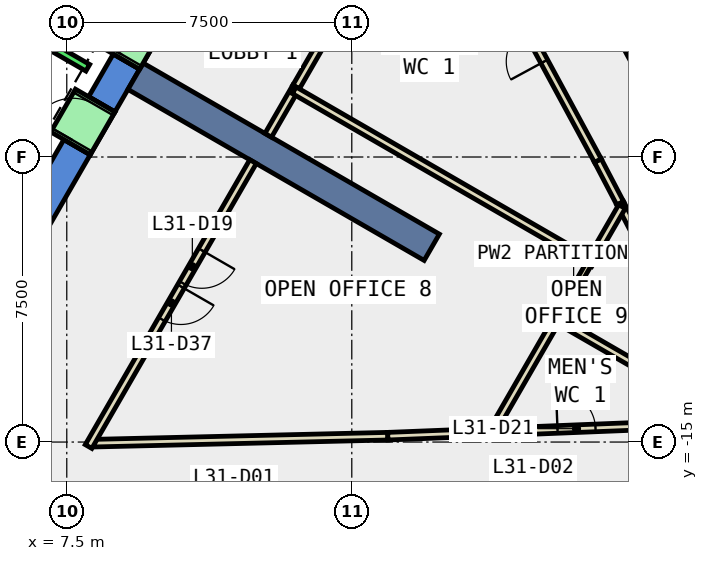
"""IFC4 building model, lengths in metres.
Left out: names, types, materials, properties, quantities, classifications, styles, units other than length and angle.
Written with IfcOpenShell. Run it as: python <this file> out.ifc"""

import sys

from ifc_helpers import new_model, si_unit, direction, frame, frame_2d, origin, place, context, subcontext, project, spatial, polyline, rectangle, outline, extrude, element, fill, save


model = new_model("IFC4")
c1 = context("Model", 3, precision=1e-05, world=origin(), true_north=direction((0.0, 1.0)))
c2 = subcontext(c1, "Body", "Model", "MODEL_VIEW")
j1 = project(units=[si_unit("LENGTHUNIT", "METRE"), si_unit("PLANEANGLEUNIT", "RADIAN")], contexts=[c1])
p1 = place(None, origin())
s1 = spatial("IfcSite", under=j1, at=p1, CompositionType="ELEMENT")
p2 = place(p1, origin())
s2 = spatial("IfcBuilding", under=s1, at=p2, CompositionType="ELEMENT")
p3 = place(p2, frame((0.0, 0.0, 142.4)))
s3 = spatial("IfcBuildingStorey", under=s2, at=p3, CompositionType="ELEMENT", Elevation=142.4)
p4 = place(p3, frame((0.0, 0.0, -0.4)))
e1 = element("IfcWall", 1, at=p4, inside=s3, PredefinedType="SHEAR", context=c2, shape_type="SweptSolid", body=[
    extrude(outline(polyline([(8.117, -7.44), (7.424, -7.04), (6.466, -8.7), (6.928, -9.5), (8.117, -7.44)])), origin(), (0.0, 0.0, 1.0), 4.2),
])
p5 = place(p3, frame((0.0, 0.0, -0.4)))
e2 = element("IfcWall", 2, at=p5, inside=s3, PredefinedType="SHEAR", context=c2, shape_type="SweptSolid", body=[
    extrude(outline(polyline([(9.417, -5.189), (8.724, -4.789), (8.075, -5.914), (8.767, -6.314), (9.417, -5.189)])), origin(), (0.0, 0.0, 1.0), 4.2),
])
p6 = place(p3, frame((0.0, 0.0, 3.6)))
e3 = element("IfcWall", 3, at=p6, inside=s3, PredefinedType="SHEAR", context=c2, shape_type="SweptSolid", body=[
    extrude(outline(polyline([(8.767, -6.314), (8.075, -5.914), (7.424, -7.04), (8.117, -7.44), (8.767, -6.314)])), origin(), (0.0, 0.0, 1.0), 0.2),
])
p7 = place(p3, frame((0.0, 0.0, 3.6)))
e4 = element("IfcWall", 4, at=p7, inside=s3, PredefinedType="SHEAR", context=c2, shape_type="SweptSolid", body=[
    extrude(outline(polyline([(10.067, -4.063), (9.374, -3.663), (8.724, -4.789), (9.417, -5.189), (10.067, -4.063)])), origin(), (0.0, 0.0, 1.0), 0.2),
])
p8 = place(p3, frame((9.31, -5.375, -0.4), z_axis=(0.0, 0.0, 1.0), x_axis=(0.866017533419, -0.500013631625, 0.0)))
e5 = element("IfcWall", 5, at=p8, inside=s3, PredefinedType="SHEAR", context=c2, shape_type="SweptSolid", body=[
    extrude(rectangle(XDim=9.0, YDim=0.8, at=frame_2d((4.5, 0.0))), origin(), (0.0, 0.0, 1.0), 4.2),
])
p9 = place(p3, frame((8.223, -15.029, 0.0), z_axis=(0.0, 0.0, 1.0), x_axis=(0.99971920994, 0.023696018186, 0.0)))
e6 = element("IfcWall", 6, at=p9, inside=s3, PredefinedType="PARTITIONING", context=c2, shape_type="SweptSolid", body=[
    extrude(rectangle(XDim=7.727, YDim=0.2, at=frame_2d((3.864, 0.0))), origin(), (0.0, 0.0, 1.0), 3.8),
])
p10 = place(p3, frame((15.948, -14.846, 0.0), z_axis=(0.0, 0.0, 1.0), x_axis=(0.999208477774, 0.039779617206, 0.0)))
e7 = element("IfcWall", 7, at=p10, inside=s3, PredefinedType="PARTITIONING", context=c2, shape_type="SweptSolid", body=[
    extrude(rectangle(XDim=2.639, YDim=0.2, at=frame_2d((1.32, 0.0))), origin(), (0.0, 0.0, 1.0), 3.8),
])
p11 = place(p3, frame((22.063, -8.717, 0.0), z_axis=(0.0, 0.0, 1.0), x_axis=(-0.463776683525, 0.885952136302, 0.0)))
e8 = element("IfcWall", 8, at=p11, inside=s3, PredefinedType="PARTITIONING", context=c2, shape_type="SweptSolid", body=[
    extrude(rectangle(XDim=1.268, YDim=0.2, at=frame_2d((0.634, 0.0))), origin(), (0.0, 0.0, 1.0), 3.8),
])
p12 = place(p3, frame((21.475, -7.594, 0.0), z_axis=(0.0, 0.0, 1.0), x_axis=(-0.475918691018, 0.879489283357, 0.0)))
e9 = element("IfcWall", 9, at=p12, inside=s3, PredefinedType="PARTITIONING", context=c2, shape_type="SweptSolid", body=[
    extrude(rectangle(XDim=6.928, YDim=0.2, at=frame_2d((3.464, 0.0))), origin(), (0.0, 0.0, 1.0), 3.8),
])
p13 = place(p12, frame((2.964, 0.0, 0.0)))
e10 = element("IfcOpeningElement", 10, at=p13, cuts=e9, PredefinedType="OPENING", context=c2, shape_type="SweptSolid", body=[
    extrude(rectangle(XDim=1.0, YDim=2.1, at=frame_2d((0.5, 1.05))), frame((0.0, 0.11, 0.0), z_axis=(0.0, -1.0, 0.0), x_axis=(1.0, 0.0, 0.0)), (0.0, 0.0, 1.0), 0.22),
])
p14 = place(p3, frame((18.585, -14.741, 0.0), z_axis=(0.0, 0.0, 1.0), x_axis=(0.99920304932, 0.039915739113, 0.0)))
e11 = element("IfcWall", 11, at=p14, inside=s3, PredefinedType="PARTITIONING", context=c2, shape_type="SweptSolid", body=[
    extrude(rectangle(XDim=4.661, YDim=0.2, at=frame_2d((2.33, 0.0))), origin(), (0.0, 0.0, 1.0), 3.8),
])
p15 = place(p14, frame((1.83, 0.0, 0.0)))
e12 = element("IfcOpeningElement", 12, at=p15, cuts=e11, PredefinedType="OPENING", context=c2, shape_type="SweptSolid", body=[
    extrude(rectangle(XDim=1.0, YDim=2.1, at=frame_2d((0.5, 1.05))), frame((0.0, 0.11, 0.0), z_axis=(0.0, -1.0, 0.0), x_axis=(1.0, 0.0, 0.0)), (0.0, 0.0, 1.0), 0.22),
])
p16 = place(p3, frame((24.224, -12.845, 0.0), z_axis=(0.0, 0.0, 1.0), x_axis=(-0.463819025987, 0.885929969655, 0.0)))
e13 = element("IfcWall", 13, at=p16, inside=s3, PredefinedType="PARTITIONING", context=c2, shape_type="SweptSolid", body=[
    extrude(rectangle(XDim=4.659, YDim=0.2, at=frame_2d((2.33, 0.0))), origin(), (0.0, 0.0, 1.0), 3.8),
])
p17 = place(p16, frame((1.83, 0.0, 0.0)))
e14 = element("IfcOpeningElement", 14, at=p17, cuts=e13, PredefinedType="OPENING", context=c2, shape_type="SweptSolid", body=[
    extrude(rectangle(XDim=1.0, YDim=2.1, at=frame_2d((0.5, 1.05))), frame((0.0, 0.11, 0.0), z_axis=(0.0, -1.0, 0.0), x_axis=(1.0, 0.0, 0.0)), (0.0, 0.0, 1.0), 0.22),
])
p18 = place(p3, frame((20.018, -0.489, 0.0), z_axis=(0.0, 0.0, 1.0), x_axis=(0.476025981828, -0.87943121654, 0.0)))
e15 = element("IfcWall", 15, at=p18, inside=s3, PredefinedType="PARTITIONING", context=c2, shape_type="SweptSolid", body=[
    extrude(rectangle(XDim=6.882, YDim=0.2, at=frame_2d((3.441, 0.0))), origin(), (0.0, 0.0, 1.0), 3.8),
])
p19 = place(p18, frame((3.016, 0.0, 0.0)))
e16 = element("IfcOpeningElement", 16, at=p19, cuts=e15, PredefinedType="OPENING", context=c2, shape_type="SweptSolid", body=[
    extrude(rectangle(XDim=1.0, YDim=2.1, at=frame_2d((0.5, 1.05))), frame((0.0, 0.11, 0.0), z_axis=(0.0, -1.0, 0.0), x_axis=(1.0, 0.0, 0.0)), (0.0, 0.0, 1.0), 0.22),
])
p20 = place(p3, frame((13.535, -5.657, 0.0), z_axis=(0.0, 0.0, 1.0), x_axis=(-0.499751238113, -0.866168978898, 0.0)))
e17 = element("IfcWall", 17, at=p20, inside=s3, PredefinedType="PARTITIONING", context=c2, shape_type="SweptSolid", body=[
    extrude(rectangle(XDim=1.469, YDim=0.2, at=frame_2d((0.734, 0.0))), origin(), (0.0, 0.0, 1.0), 3.8),
])
p21 = place(p3, frame((17.124, 0.56, 0.0), z_axis=(0.0, 0.0, 1.0), x_axis=(-0.49996876383, -0.866043437245, 0.0)))
e18 = element("IfcWall", 18, at=p21, inside=s3, PredefinedType="PARTITIONING", context=c2, shape_type="SweptSolid", body=[
    extrude(rectangle(XDim=7.179, YDim=0.2, at=frame_2d((3.589, 0.0))), origin(), (0.0, 0.0, 1.0), 3.8),
])
p22 = place(p3, frame((13.485, -5.744, 0.0), z_axis=(0.0, 0.0, 1.0), x_axis=(0.865950545648, -0.500129635687, 0.0)))
e19 = element("IfcWall", 19, at=p22, inside=s3, PredefinedType="PARTITIONING", context=c2, shape_type="SweptSolid", body=[
    extrude(rectangle(XDim=9.1, YDim=0.2, at=frame_2d((4.55, 0.0))), origin(), (0.0, 0.0, 1.0), 3.8),
])
p23 = place(p3, frame((20.347, -11.858, 0.0), z_axis=(0.0, 0.0, 1.0), x_axis=(-0.49990681678, -0.866079196458, 0.0)))
e20 = element("IfcWall", 20, at=p23, inside=s3, PredefinedType="PARTITIONING", context=c2, shape_type="SweptSolid", body=[
    extrude(rectangle(XDim=3.324, YDim=0.2, at=frame_2d((1.662, 0.0))), origin(), (0.0, 0.0, 1.0), 3.8),
])
p24 = place(p3, frame((21.228, -10.331, 0.0), z_axis=(0.0, 0.0, 1.0), x_axis=(-0.499920861661, -0.866071089505, 0.0)))
e21 = element("IfcWall", 21, at=p24, inside=s3, PredefinedType="PARTITIONING", context=c2, shape_type="SweptSolid", body=[
    extrude(rectangle(XDim=1.562, YDim=0.15, at=frame_2d((0.781, 0.0))), origin(), (0.0, 0.0, 1.0), 3.8),
])
p25 = place(p3, frame((22.109, -8.805, 0.0), z_axis=(0.0, 0.0, 1.0), x_axis=(-0.499920861661, -0.866071089505, 0.0)))
e22 = element("IfcWall", 22, at=p25, inside=s3, PredefinedType="PARTITIONING", context=c2, shape_type="SweptSolid", body=[
    extrude(rectangle(XDim=1.562, YDim=0.2, at=frame_2d((0.781, 0.0))), origin(), (0.0, 0.0, 1.0), 3.8),
])
p26 = place(p3, frame((20.31, -11.721, 0.0), z_axis=(0.0, 0.0, 1.0), x_axis=(0.86603399059, -0.499985126921, 0.0)))
e23 = element("IfcWall", 23, at=p26, inside=s3, PredefinedType="PARTITIONING", context=c2, shape_type="SweptSolid", body=[
    extrude(rectangle(XDim=4.854, YDim=0.2, at=frame_2d((2.427, 0.0))), origin(), (0.0, 0.0, 1.0), 3.8),
])
p27 = place(p3, frame((12.401, -7.621, 0.0), z_axis=(0.0, 0.0, 1.0), x_axis=(-0.499964151829, -0.866046099747, 0.0)))
e24 = element("IfcWall", 24, at=p27, inside=s3, PredefinedType="PARTITIONING", context=c2, shape_type="SweptSolid", body=[
    extrude(rectangle(XDim=8.656, YDim=0.2, at=frame_2d((4.328, 0.0))), origin(), (0.0, 0.0, 1.0), 3.8),
])
p28 = place(p27, frame((2.694, 0.0, 0.0)))
e25 = element("IfcOpeningElement", 25, at=p28, cuts=e24, PredefinedType="OPENING", context=c2, shape_type="SweptSolid", body=[
    extrude(rectangle(XDim=1.0, YDim=2.1, at=frame_2d((0.5, 1.05))), frame((0.0, 0.11, 0.0), z_axis=(0.0, -1.0, 0.0), x_axis=(1.0, 0.0, 0.0)), (0.0, 0.0, 1.0), 0.22),
])
p29 = place(p27, frame((3.794, 0.0, 0.0)))
e26 = element("IfcOpeningElement", 26, at=p29, cuts=e24, PredefinedType="OPENING", context=c2, shape_type="SweptSolid", body=[
    extrude(rectangle(XDim=1.0, YDim=2.1, at=frame_2d((0.5, 1.05))), frame((0.0, 0.11, 0.0), z_axis=(0.0, -1.0, 0.0), x_axis=(1.0, 0.0, 0.0)), (0.0, 0.0, 1.0), 0.22),
])
p30 = place(p3, frame((4.451, -6.19, 0.0), z_axis=(0.0, 0.0, 1.0), x_axis=(0.50000090737, 0.866024879913, 0.0)))
e27 = element("IfcWall", 27, at=p30, inside=s3, PredefinedType="STANDARD", context=c2, shape_type="SweptSolid", body=[
    extrude(rectangle(XDim=10.6, YDim=0.2, at=frame_2d((5.3, 0.0))), origin(), (0.0, 0.0, 1.0), 3.8),
])
p31 = place(p3, frame((5.888, -3.902, 0.0), z_axis=(0.0, 0.0, 1.0), x_axis=(0.866022959057, -0.500004234368, 0.0)))
e28 = element("IfcWall", 28, at=p31, inside=s3, PredefinedType="STANDARD", context=c2, shape_type="SweptSolid", body=[
    extrude(rectangle(XDim=2.5, YDim=0.2, at=frame_2d((1.25, 0.0))), origin(), (0.0, 0.0, 1.0), 3.8),
])
p32 = place(p3, frame((7.598, -7.14, 0.0), z_axis=(0.0, 0.0, 1.0), x_axis=(0.500362116554, 0.865816234728, 0.0)))
e29 = element("IfcWall", 29, at=p32, inside=s3, PredefinedType="STANDARD", context=c2, shape_type="SweptSolid", body=[
    extrude(rectangle(XDim=1.299, YDim=1.2, at=frame_2d((0.65, 0.0))), origin(), (0.0, 0.0, 1.0), 2.4),
])
p33 = place(p32, frame((0.1, 0.0, 0.0)))
e30 = element("IfcOpeningElement", 30, at=p33, cuts=e29, PredefinedType="OPENING", context=c2, shape_type="SweptSolid", body=[
    extrude(rectangle(XDim=1.1, YDim=2.3, at=frame_2d((0.55, 1.15))), frame((0.0, 0.61, 0.0), z_axis=(0.0, -1.0, 0.0), x_axis=(1.0, 0.0, 0.0)), (0.0, 0.0, 1.0), 1.22),
])
p34 = place(p3, frame((8.898, -4.889, 0.0), z_axis=(0.0, 0.0, 1.0), x_axis=(0.500036693733, 0.866004217611, 0.0)))
e31 = element("IfcWall", 31, at=p34, inside=s3, PredefinedType="STANDARD", context=c2, shape_type="SweptSolid", body=[
    extrude(rectangle(XDim=1.3, YDim=1.2, at=frame_2d((0.65, 0.0))), origin(), (0.0, 0.0, 1.0), 2.4),
])
p35 = place(p34, frame((0.1, 0.0, 0.0)))
e32 = element("IfcOpeningElement", 32, at=p35, cuts=e31, PredefinedType="OPENING", context=c2, shape_type="SweptSolid", body=[
    extrude(rectangle(XDim=1.1, YDim=2.3, at=frame_2d((0.55, 1.15))), frame((0.0, 0.61, 0.0), z_axis=(0.0, -1.0, 0.0), x_axis=(1.0, 0.0, 0.0)), (0.0, 0.0, 1.0), 1.22),
])
p36 = place(p28, origin())
e33 = element("IfcDoor", 33, at=p36, inside=s3, OperationType="SINGLE_SWING_LEFT", PredefinedType="DOOR", context=c2, shape_type="SweptSolid", body=[
    extrude(rectangle(XDim=1.0, YDim=2.1, at=frame_2d((0.5, 1.05))), frame((0.0, 0.025, 0.0), z_axis=(0.0, -1.0, 0.0), x_axis=(1.0, 0.0, 0.0)), (0.0, 0.0, 1.0), 0.05),
])
fill(e25, e33)
p37 = place(p13, origin())
e34 = element("IfcDoor", 34, at=p37, inside=s3, OperationType="SINGLE_SWING_LEFT", PredefinedType="DOOR", context=c2, shape_type="SweptSolid", body=[
    extrude(rectangle(XDim=1.0, YDim=2.1, at=frame_2d((0.5, 1.05))), frame((0.0, 0.025, 0.0), z_axis=(0.0, -1.0, 0.0), x_axis=(1.0, 0.0, 0.0)), (0.0, 0.0, 1.0), 0.05),
])
fill(e10, e34)
p38 = place(p15, origin())
e35 = element("IfcDoor", 35, at=p38, inside=s3, OperationType="SINGLE_SWING_LEFT", PredefinedType="DOOR", context=c2, shape_type="SweptSolid", body=[
    extrude(rectangle(XDim=1.0, YDim=2.1, at=frame_2d((0.5, 1.05))), frame((0.0, 0.025, 0.0), z_axis=(0.0, -1.0, 0.0), x_axis=(1.0, 0.0, 0.0)), (0.0, 0.0, 1.0), 0.05),
])
fill(e12, e35)
p39 = place(p29, origin())
e36 = element("IfcDoor", 36, at=p39, inside=s3, OperationType="SINGLE_SWING_RIGHT", PredefinedType="DOOR", context=c2, shape_type="SweptSolid", body=[
    extrude(rectangle(XDim=1.0, YDim=2.1, at=frame_2d((0.5, 1.05))), frame((0.0, 0.025, 0.0), z_axis=(0.0, -1.0, 0.0), x_axis=(1.0, 0.0, 0.0)), (0.0, 0.0, 1.0), 0.05),
])
fill(e26, e36)
p40 = place(p33, origin())
e37 = element("IfcDoor", 37, at=p40, inside=s3, OperationType="SLIDING_TO_LEFT", PredefinedType="DOOR", context=c2, shape_type="SweptSolid", body=[
    extrude(rectangle(XDim=1.1, YDim=2.3, at=frame_2d((0.55, 1.15))), frame((0.0, 0.025, 0.0), z_axis=(0.0, -1.0, 0.0), x_axis=(1.0, 0.0, 0.0)), (0.0, 0.0, 1.0), 0.05),
])
fill(e30, e37)
p41 = place(p35, origin())
e38 = element("IfcDoor", 38, at=p41, inside=s3, OperationType="SLIDING_TO_LEFT", PredefinedType="DOOR", context=c2, shape_type="SweptSolid", body=[
    extrude(rectangle(XDim=1.1, YDim=2.3, at=frame_2d((0.55, 1.15))), frame((0.0, 0.025, 0.0), z_axis=(0.0, -1.0, 0.0), x_axis=(1.0, 0.0, 0.0)), (0.0, 0.0, 1.0), 0.05),
])
fill(e32, e38)
save(model, sys.argv[1])
